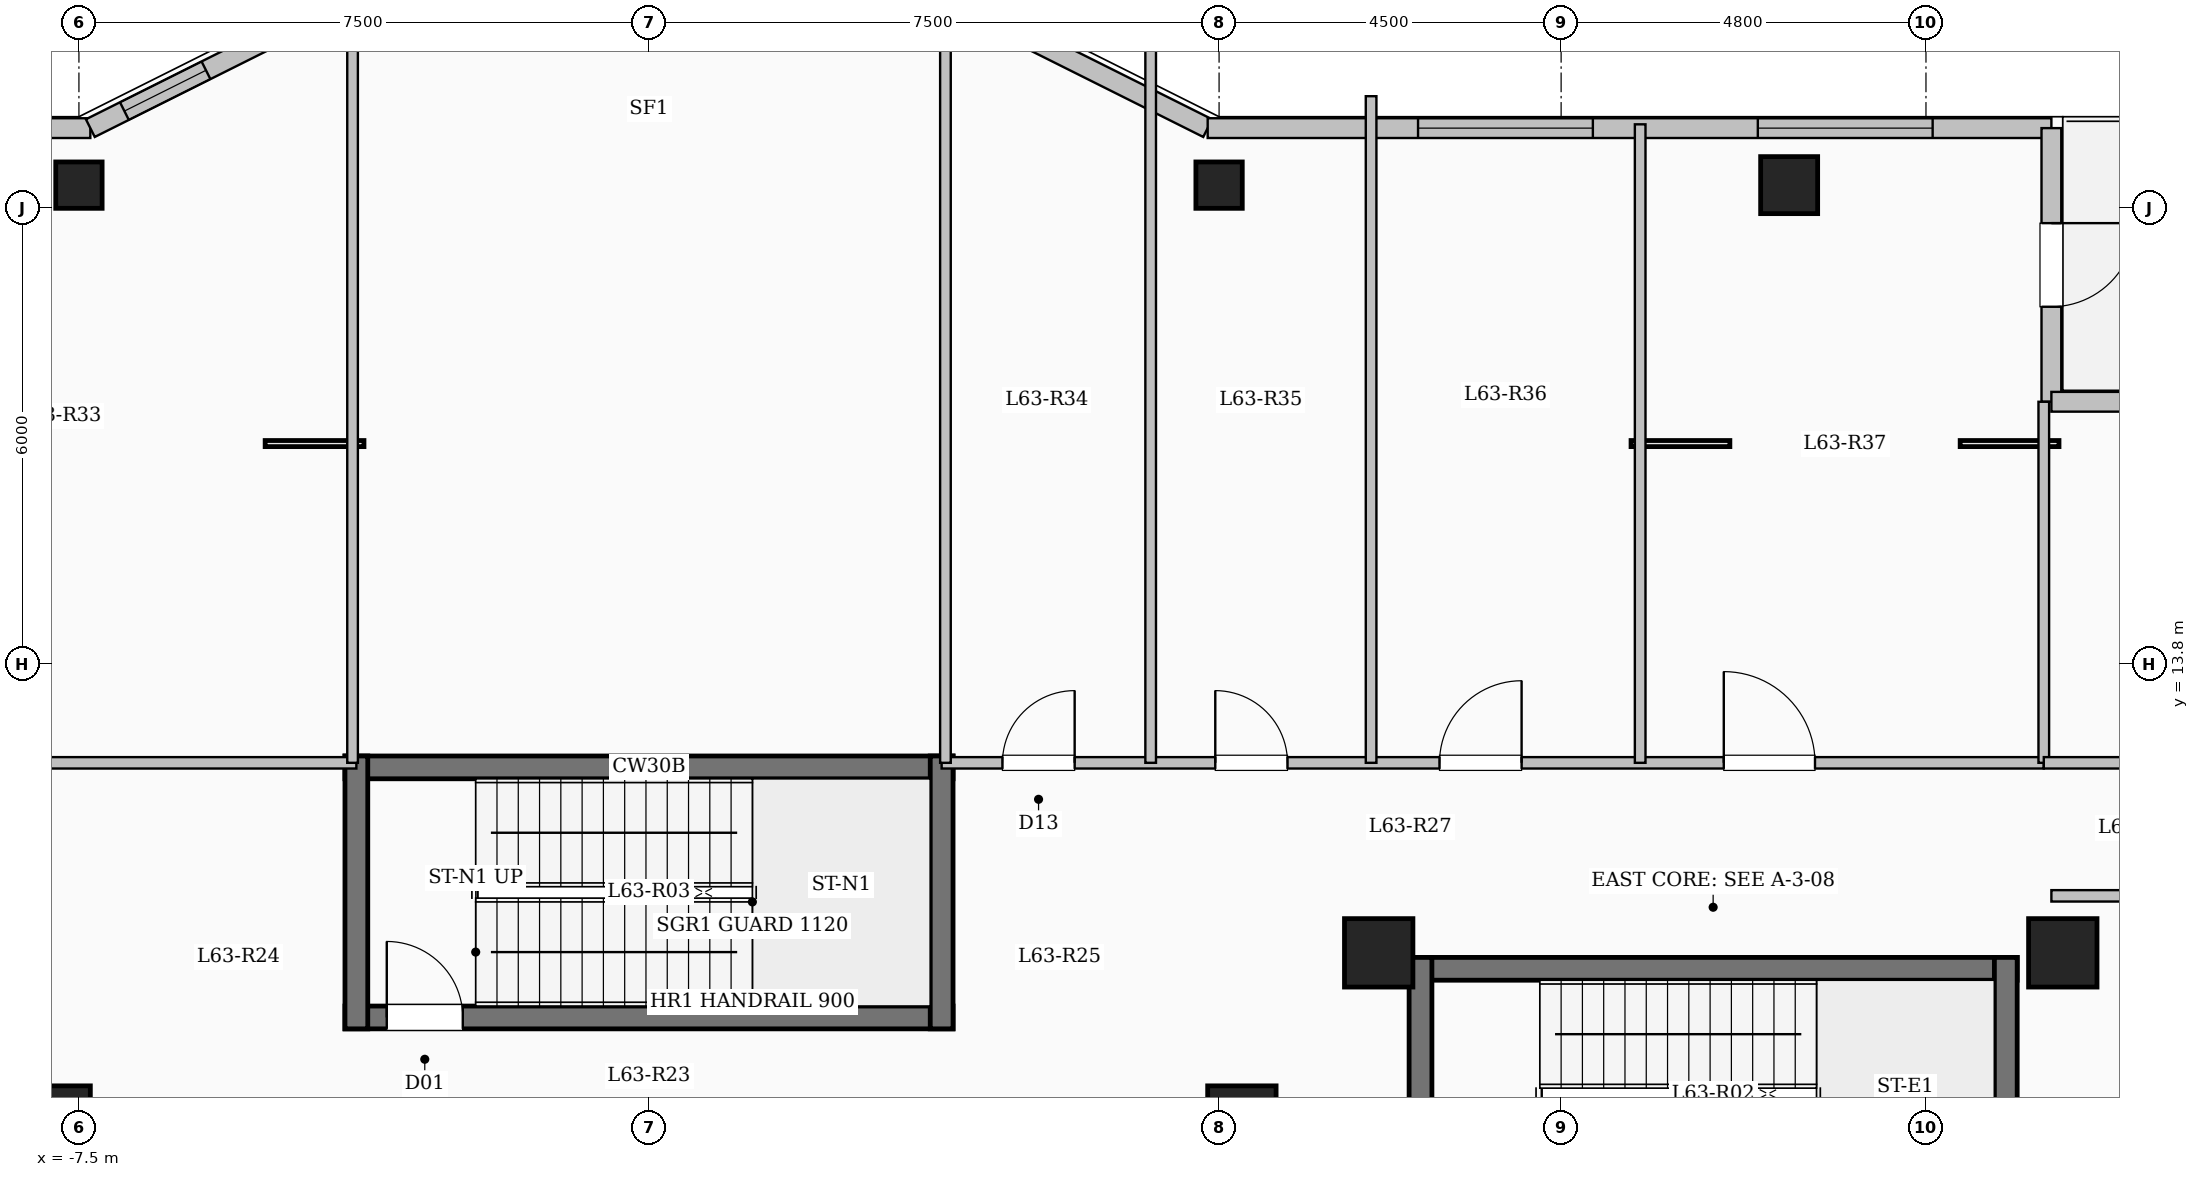
"""IFC4 building model, lengths in metres.
Left out: names, types, materials, properties, quantities, classifications, styles, units other than length and angle.
Written with IfcOpenShell. Run it as: python <this file> out.ifc"""

import sys

from ifc_helpers import new_model, si_unit, direction, frame, frame_2d, origin, origin_2d, place, context, subcontext, project, spatial, rectangle, hollow_circle, extrude, element, fill, save


model = new_model("IFC4")
c1 = context("Model", 3, precision=1e-05, world=origin(), true_north=direction((0.0, 1.0)))
c2 = subcontext(c1, "Body", "Model", "MODEL_VIEW")
j1 = project(units=[si_unit("LENGTHUNIT", "METRE"), si_unit("PLANEANGLEUNIT", "RADIAN")], contexts=[c1])
p1 = place(None, origin())
s1 = spatial("IfcSite", under=j1, at=p1, CompositionType="ELEMENT")
p2 = place(p1, origin())
s2 = spatial("IfcBuilding", under=s1, at=p2, CompositionType="ELEMENT")
p3 = place(p2, frame((0.0, 0.0, 231.75)))
s3 = spatial("IfcBuildingStorey", under=s2, at=p3, CompositionType="ELEMENT", Elevation=231.75)
for number, where, z_axis, x_axis in (
    (1, (-7.8, 7.8, 0.0), (0.0, 0.0, 1.0), (1.0, 0.0, 0.0)),
    (2, (7.8, 7.8, 0.0), (0.0, 0.0, 1.0), (1.0, 0.0, 0.0)),
    (3, (9.6, 10.0, 0.0), (0.0, 0.0, 1.0), (1.0, 0.0, 0.0)),
    (4, (18.6, 10.0, 0.0), (0.0, 0.0, 1.0), (1.0, 0.0, 0.0)),
):
    element("IfcColumn", number, at=place(p3, frame(where, z_axis=z_axis, x_axis=x_axis)), inside=s3, PredefinedType="COLUMN", context=c2, shape_type="SweptSolid", body=[
        extrude(rectangle(XDim=0.9, YDim=0.9, at=origin_2d()), origin(), (0.0, 0.0, 1.0), 4.65),
    ])
for number, where, z_axis, x_axis in (
    (5, (-7.5, 20.1, 0.0), (0.0, 0.0, 1.0), (1.0, 0.0, 0.0)),
    (6, (7.5, 20.1, 0.0), (0.0, 0.0, 1.0), (1.0, 0.0, 0.0)),
):
    element("IfcColumn", number, at=place(p3, frame(where, z_axis=z_axis, x_axis=x_axis)), inside=s3, PredefinedType="COLUMN", context=c2, shape_type="SweptSolid", body=[
        extrude(hollow_circle(Radius=0.305, WallThickness=0.025, at=origin_2d()), origin(), (0.0, 0.0, 1.0), 4.65),
    ])
p4 = place(p3, frame((15.0, 20.1, 0.0), z_axis=(0.0, 0.0, 1.0), x_axis=(1.0, 0.0, 0.0)))
e7 = element("IfcColumn", 7, at=p4, inside=s3, PredefinedType="COLUMN", context=c2, shape_type="SweptSolid", body=[
    extrude(rectangle(XDim=0.75, YDim=0.75, at=origin_2d()), origin(), (0.0, 0.0, 1.0), 4.65),
])
p5 = place(p3, frame((-18.45, 20.85, 0.0), z_axis=(0.0, 0.0, 1.0), x_axis=(1.0, 0.0, 0.0)))
e8 = element("IfcWall", 8, at=p5, inside=s3, PredefinedType="SOLIDWALL", context=c2, shape_type="SweptSolid", body=[
    extrude(rectangle(XDim=11.1, YDim=0.26, at=frame_2d((5.55, 0.0))), origin(), (0.0, 0.0, 1.0), 4.35),
])
p6 = place(p5, frame((2.14, 0.0, 0.85)))
e9 = element("IfcOpeningElement", 9, at=p6, cuts=e8, PredefinedType="OPENING", context=c2, shape_type="SweptSolid", body=[
    extrude(rectangle(XDim=2.3, YDim=2.2, at=frame_2d((1.15, 1.1))), frame((0.0, 0.14, 0.0), z_axis=(0.0, -1.0, 0.0), x_axis=(1.0, 0.0, 0.0)), (0.0, 0.0, 1.0), 0.28),
])
p7 = place(p5, frame((7.765, 0.0, 0.85)))
e10 = element("IfcOpeningElement", 10, at=p7, cuts=e8, PredefinedType="OPENING", context=c2, shape_type="SweptSolid", body=[
    extrude(rectangle(XDim=2.3, YDim=2.2, at=frame_2d((1.15, 1.1))), frame((0.0, 0.14, 0.0), z_axis=(0.0, -1.0, 0.0), x_axis=(1.0, 0.0, 0.0)), (0.0, 0.0, 1.0), 0.28),
])
p8 = place(p3, frame((-7.35, 20.85, 0.0), z_axis=(0.0, 0.0, 1.0), x_axis=(0.894427191, 0.4472135955, 0.0)))
e11 = element("IfcWall", 11, at=p8, inside=s3, PredefinedType="SOLIDWALL", context=c2, shape_type="SweptSolid", body=[
    extrude(rectangle(XDim=3.354, YDim=0.26, at=frame_2d((1.677, 0.0))), origin(), (0.0, 0.0, 1.0), 4.35),
])
p9 = place(p8, frame((0.501, 0.0, 0.95)))
e12 = element("IfcOpeningElement", 12, at=p9, cuts=e11, PredefinedType="OPENING", context=c2, shape_type="SweptSolid", body=[
    extrude(rectangle(XDim=1.2, YDim=1.5, at=frame_2d((0.6, 0.75))), frame((0.0, 0.14, 0.0), z_axis=(0.0, -1.0, 0.0), x_axis=(1.0, 0.0, 0.0)), (0.0, 0.0, 1.0), 0.28),
])
p10 = place(p3, frame((4.35, 22.35, 0.0), z_axis=(0.0, 0.0, 1.0), x_axis=(0.894427191, -0.4472135955, 0.0)))
e13 = element("IfcWall", 13, at=p10, inside=s3, PredefinedType="SOLIDWALL", context=c2, shape_type="SweptSolid", body=[
    extrude(rectangle(XDim=3.354, YDim=0.26, at=frame_2d((1.677, 0.0))), origin(), (0.0, 0.0, 1.0), 4.35),
])
p11 = place(p3, frame((7.35, 20.85, 0.0), z_axis=(0.0, 0.0, 1.0), x_axis=(1.0, 0.0, 0.0)))
e14 = element("IfcWall", 14, at=p11, inside=s3, PredefinedType="SOLIDWALL", context=c2, shape_type="SweptSolid", body=[
    extrude(rectangle(XDim=11.1, YDim=0.26, at=frame_2d((5.55, 0.0))), origin(), (0.0, 0.0, 1.0), 4.35),
])
p12 = place(p11, frame((2.768, 0.0, 0.85)))
e15 = element("IfcOpeningElement", 15, at=p12, cuts=e14, PredefinedType="OPENING", context=c2, shape_type="SweptSolid", body=[
    extrude(rectangle(XDim=2.3, YDim=2.2, at=frame_2d((1.15, 1.1))), frame((0.0, 0.14, 0.0), z_axis=(0.0, -1.0, 0.0), x_axis=(1.0, 0.0, 0.0)), (0.0, 0.0, 1.0), 0.28),
])
p13 = place(p11, frame((7.238, 0.0, 0.85)))
e16 = element("IfcOpeningElement", 16, at=p13, cuts=e14, PredefinedType="OPENING", context=c2, shape_type="SweptSolid", body=[
    extrude(rectangle(XDim=2.3, YDim=2.2, at=frame_2d((1.15, 1.1))), frame((0.0, 0.14, 0.0), z_axis=(0.0, -1.0, 0.0), x_axis=(1.0, 0.0, 0.0)), (0.0, 0.0, 1.0), 0.28),
])
p14 = place(p3, frame((18.45, 20.85, 0.0), z_axis=(0.0, 0.0, 1.0), x_axis=(0.0, -1.0, 0.0)))
e17 = element("IfcWall", 17, at=p14, inside=s3, PredefinedType="SOLIDWALL", context=c2, shape_type="SweptSolid", body=[
    extrude(rectangle(XDim=3.6, YDim=0.26, at=frame_2d((1.8, 0.0))), origin(), (0.0, 0.0, 1.0), 4.35),
])
p15 = place(p14, frame((1.25, 0.0, 0.0)))
e18 = element("IfcOpeningElement", 18, at=p15, cuts=e17, PredefinedType="OPENING", context=c2, shape_type="SweptSolid", body=[
    extrude(rectangle(XDim=1.1, YDim=2.2, at=frame_2d((0.55, 1.1))), frame((0.0, 0.14, 0.0), z_axis=(0.0, -1.0, 0.0), x_axis=(1.0, 0.0, 0.0)), (0.0, 0.0, 1.0), 0.28),
])
p16 = place(p3, frame((18.45, 17.25, 0.0), z_axis=(0.0, 0.0, 1.0), x_axis=(1.0, 0.0, 0.0)))
e19 = element("IfcWall", 19, at=p16, inside=s3, PredefinedType="SOLIDWALL", context=c2, shape_type="SweptSolid", body=[
    extrude(rectangle(XDim=5.1, YDim=0.26, at=frame_2d((2.55, 0.0))), origin(), (0.0, 0.0, 1.0), 4.35),
])
p17 = place(p16, frame((1.375, 0.0, 0.85)))
e20 = element("IfcOpeningElement", 20, at=p17, cuts=e19, PredefinedType="OPENING", context=c2, shape_type="SweptSolid", body=[
    extrude(rectangle(XDim=2.3, YDim=2.2, at=frame_2d((1.15, 1.1))), frame((0.0, 0.14, 0.0), z_axis=(0.0, -1.0, 0.0), x_axis=(1.0, 0.0, 0.0)), (0.0, 0.0, 1.0), 0.28),
])
p18 = place(p3, frame((10.0, 9.79, 0.0), z_axis=(0.0, 0.0, 1.0), x_axis=(1.0, 0.0, 0.0)))
e21 = element("IfcWall", 21, at=p18, inside=s3, PredefinedType="SHEAR", context=c2, shape_type="SweptSolid", body=[
    extrude(rectangle(XDim=8.0, YDim=0.3, at=frame_2d((4.0, 0.0))), origin(), (0.0, 0.0, 1.0), 4.65),
])
for number, where, z_axis, x_axis in (
    (22, (10.15, 6.35, 0.0), (0.0, 0.0, 1.0), (0.0, 1.0, 0.0)),
    (23, (17.85, 6.35, 0.0), (0.0, 0.0, 1.0), (0.0, 1.0, 0.0)),
):
    element("IfcWall", number, at=place(p3, frame(where, z_axis=z_axis, x_axis=x_axis)), inside=s3, PredefinedType="SHEAR", context=c2, shape_type="SweptSolid", body=[
        extrude(rectangle(XDim=3.59, YDim=0.3, at=frame_2d((1.795, 0.0))), origin(), (0.0, 0.0, 1.0), 4.65),
    ])
p19 = place(p3, frame((-4.0, 12.44, 0.0), z_axis=(0.0, 0.0, 1.0), x_axis=(1.0, 0.0, 0.0)))
e24 = element("IfcWall", 24, at=p19, inside=s3, PredefinedType="SHEAR", context=c2, shape_type="SweptSolid", body=[
    extrude(rectangle(XDim=8.0, YDim=0.3, at=frame_2d((4.0, 0.0))), origin(), (0.0, 0.0, 1.0), 4.65),
])
p20 = place(p3, frame((-4.0, 9.15, 0.0), z_axis=(0.0, 0.0, 1.0), x_axis=(1.0, 0.0, 0.0)))
e25 = element("IfcWall", 25, at=p20, inside=s3, PredefinedType="SHEAR", context=c2, shape_type="SweptSolid", body=[
    extrude(rectangle(XDim=8.0, YDim=0.3, at=frame_2d((4.0, 0.0))), origin(), (0.0, 0.0, 1.0), 4.65),
])
p21 = place(p20, frame((0.55, 0.0, 0.0)))
e26 = element("IfcOpeningElement", 26, at=p21, cuts=e25, PredefinedType="OPENING", context=c2, shape_type="SweptSolid", body=[
    extrude(rectangle(XDim=1.0, YDim=2.15, at=frame_2d((0.5, 1.075))), frame((0.0, 0.16, 0.0), z_axis=(0.0, -1.0, 0.0), x_axis=(1.0, 0.0, 0.0)), (0.0, 0.0, 1.0), 0.32),
])
for number, where, z_axis, x_axis in (
    (27, (-3.85, 9.0, 0.0), (0.0, 0.0, 1.0), (0.0, 1.0, 0.0)),
    (28, (3.85, 9.0, 0.0), (0.0, 0.0, 1.0), (0.0, 1.0, 0.0)),
):
    element("IfcWall", number, at=place(p3, frame(where, z_axis=z_axis, x_axis=x_axis)), inside=s3, PredefinedType="SHEAR", context=c2, shape_type="SweptSolid", body=[
        extrude(rectangle(XDim=3.59, YDim=0.3, at=frame_2d((1.795, 0.0))), origin(), (0.0, 0.0, 1.0), 4.65),
    ])
p22 = place(p3, frame((-18.35, 12.5, 0.0), z_axis=(0.0, 0.0, 1.0), x_axis=(1.0, 0.0, 0.0)))
e29 = element("IfcWall", 29, at=p22, inside=s3, PredefinedType="PARTITIONING", context=c2, shape_type="SweptSolid", body=[
    extrude(rectangle(XDim=14.5, YDim=0.15, at=frame_2d((7.25, 0.0))), origin(), (0.0, 0.0, 1.0), 4.35),
])
p23 = place(p22, frame((1.2, 0.0, 0.0)))
e30 = element("IfcOpeningElement", 30, at=p23, cuts=e29, PredefinedType="OPENING", context=c2, shape_type="SweptSolid", body=[
    extrude(rectangle(XDim=1.2, YDim=2.15, at=frame_2d((0.6, 1.075))), frame((0.0, 0.085, 0.0), z_axis=(0.0, -1.0, 0.0), x_axis=(1.0, 0.0, 0.0)), (0.0, 0.0, 1.0), 0.17),
])
p24 = place(p22, frame((7.58, 0.0, 0.0)))
e31 = element("IfcOpeningElement", 31, at=p24, cuts=e29, PredefinedType="OPENING", context=c2, shape_type="SweptSolid", body=[
    extrude(rectangle(XDim=1.08, YDim=2.15, at=frame_2d((0.54, 1.075))), frame((0.0, 0.085, 0.0), z_axis=(0.0, -1.0, 0.0), x_axis=(1.0, 0.0, 0.0)), (0.0, 0.0, 1.0), 0.17),
])
p25 = place(p3, frame((3.85, 12.5, 0.0), z_axis=(0.0, 0.0, 1.0), x_axis=(1.0, 0.0, 0.0)))
e32 = element("IfcWall", 32, at=p25, inside=s3, PredefinedType="PARTITIONING", context=c2, shape_type="SweptSolid", body=[
    extrude(rectangle(XDim=14.5, YDim=0.15, at=frame_2d((7.25, 0.0))), origin(), (0.0, 0.0, 1.0), 4.35),
])
p26 = place(p25, frame((0.8, 0.0, 0.0)))
e33 = element("IfcOpeningElement", 33, at=p26, cuts=e32, PredefinedType="OPENING", context=c2, shape_type="SweptSolid", body=[
    extrude(rectangle(XDim=0.95, YDim=2.15, at=frame_2d((0.475, 1.075))), frame((0.0, 0.085, 0.0), z_axis=(0.0, -1.0, 0.0), x_axis=(1.0, 0.0, 0.0)), (0.0, 0.0, 1.0), 0.17),
])
p27 = place(p25, frame((3.6, 0.0, 0.0)))
e34 = element("IfcOpeningElement", 34, at=p27, cuts=e32, PredefinedType="OPENING", context=c2, shape_type="SweptSolid", body=[
    extrude(rectangle(XDim=0.95, YDim=2.15, at=frame_2d((0.475, 1.075))), frame((0.0, 0.085, 0.0), z_axis=(0.0, -1.0, 0.0), x_axis=(1.0, 0.0, 0.0)), (0.0, 0.0, 1.0), 0.17),
])
p28 = place(p25, frame((6.55, 0.0, 0.0)))
e35 = element("IfcOpeningElement", 35, at=p28, cuts=e32, PredefinedType="OPENING", context=c2, shape_type="SweptSolid", body=[
    extrude(rectangle(XDim=1.08, YDim=2.15, at=frame_2d((0.54, 1.075))), frame((0.0, 0.085, 0.0), z_axis=(0.0, -1.0, 0.0), x_axis=(1.0, 0.0, 0.0)), (0.0, 0.0, 1.0), 0.17),
])
p29 = place(p25, frame((10.29, 0.0, 0.0)))
e36 = element("IfcOpeningElement", 36, at=p29, cuts=e32, PredefinedType="OPENING", context=c2, shape_type="SweptSolid", body=[
    extrude(rectangle(XDim=1.2, YDim=2.15, at=frame_2d((0.6, 1.075))), frame((0.0, 0.085, 0.0), z_axis=(0.0, -1.0, 0.0), x_axis=(1.0, 0.0, 0.0)), (0.0, 0.0, 1.0), 0.17),
])
for number, where, z_axis, x_axis in (
    (37, (-3.9, 12.5, 0.0), (0.0, 0.0, 1.0), (0.0, 1.0, 0.0)),
    (38, (3.9, 12.5, 0.0), (0.0, 0.0, 1.0), (0.0, 1.0, 0.0)),
):
    element("IfcWall", number, at=place(p3, frame(where, z_axis=z_axis, x_axis=x_axis)), inside=s3, PredefinedType="PARTITIONING", context=c2, shape_type="SweptSolid", body=[
        extrude(rectangle(XDim=9.88, YDim=0.14, at=frame_2d((4.94, 0.0))), origin(), (0.0, 0.0, 1.0), 4.35),
    ])
p30 = place(p3, frame((6.6, 12.5, 0.0), z_axis=(0.0, 0.0, 1.0), x_axis=(0.0, 1.0, 0.0)))
e39 = element("IfcWall", 39, at=p30, inside=s3, PredefinedType="PARTITIONING", context=c2, shape_type="SweptSolid", body=[
    extrude(rectangle(XDim=9.485, YDim=0.14, at=frame_2d((4.743, 0.0))), origin(), (0.0, 0.0, 1.0), 4.35),
])
p31 = place(p3, frame((9.5, 12.5, 0.0), z_axis=(0.0, 0.0, 1.0), x_axis=(0.0, 1.0, 0.0)))
e40 = element("IfcWall", 40, at=p31, inside=s3, PredefinedType="PARTITIONING", context=c2, shape_type="SweptSolid", body=[
    extrude(rectangle(XDim=8.77, YDim=0.14, at=frame_2d((4.385, 0.0))), origin(), (0.0, 0.0, 1.0), 4.35),
])
p32 = place(p3, frame((13.04, 12.5, 0.0), z_axis=(0.0, 0.0, 1.0), x_axis=(0.0, 1.0, 0.0)))
e41 = element("IfcWall", 41, at=p32, inside=s3, PredefinedType="PARTITIONING", context=c2, shape_type="SweptSolid", body=[
    extrude(rectangle(XDim=8.4, YDim=0.14, at=frame_2d((4.2, 0.0))), origin(), (0.0, 0.0, 1.0), 4.35),
])
p33 = place(p3, frame((18.45, 10.75, 0.0), z_axis=(0.0, 0.0, 1.0), x_axis=(1.0, 0.0, 0.0)))
e42 = element("IfcWall", 42, at=p33, inside=s3, PredefinedType="PARTITIONING", context=c2, shape_type="SweptSolid", body=[
    extrude(rectangle(XDim=5.13, YDim=0.15, at=frame_2d((2.565, 0.0))), origin(), (0.0, 0.0, 1.0), 4.35),
])
p34 = place(p3, frame((18.35, 12.5, 0.0), z_axis=(0.0, 0.0, 1.0), x_axis=(0.0, 1.0, 0.0)))
e43 = element("IfcWall", 43, at=p34, inside=s3, PredefinedType="PARTITIONING", context=c2, shape_type="SweptSolid", body=[
    extrude(rectangle(XDim=4.75, YDim=0.14, at=frame_2d((2.375, 0.0))), origin(), (0.0, 0.0, 1.0), 4.35),
])
p35 = place(p3, frame((18.35, 12.5, 0.0), z_axis=(0.0, 0.0, 1.0), x_axis=(1.0, 0.0, 0.0)))
e44 = element("IfcWall", 44, at=p35, inside=s3, PredefinedType="PARTITIONING", context=c2, shape_type="SweptSolid", body=[
    extrude(rectangle(XDim=5.23, YDim=0.15, at=frame_2d((2.615, 0.0))), origin(), (0.0, 0.0, 1.0), 4.35),
])
p36 = place(p35, frame((2.14, 0.0, 0.0)))
e45 = element("IfcOpeningElement", 45, at=p36, cuts=e44, PredefinedType="OPENING", context=c2, shape_type="SweptSolid", body=[
    extrude(rectangle(XDim=0.95, YDim=2.15, at=frame_2d((0.475, 1.075))), frame((0.0, 0.085, 0.0), z_axis=(0.0, -1.0, 0.0), x_axis=(1.0, 0.0, 0.0)), (0.0, 0.0, 1.0), 0.17),
])
p37 = place(p9, origin())
e46 = element("IfcWindow", 46, at=p37, inside=s3, PartitioningType="SINGLE_PANEL", PredefinedType="WINDOW", context=c2, shape_type="SweptSolid", body=[
    extrude(rectangle(XDim=1.2, YDim=1.5, at=frame_2d((0.6, 0.75))), frame((0.0, 0.03, 0.0), z_axis=(0.0, -1.0, 0.0), x_axis=(1.0, 0.0, 0.0)), (0.0, 0.0, 1.0), 0.06),
])
fill(e12, e46)
p38 = place(p12, origin())
e47 = element("IfcWindow", 47, at=p38, inside=s3, PartitioningType="SINGLE_PANEL", PredefinedType="WINDOW", context=c2, shape_type="SweptSolid", body=[
    extrude(rectangle(XDim=2.3, YDim=2.2, at=frame_2d((1.15, 1.1))), frame((0.0, 0.03, 0.0), z_axis=(0.0, -1.0, 0.0), x_axis=(1.0, 0.0, 0.0)), (0.0, 0.0, 1.0), 0.06),
])
fill(e15, e47)
p39 = place(p13, origin())
e48 = element("IfcWindow", 48, at=p39, inside=s3, PartitioningType="SINGLE_PANEL", PredefinedType="WINDOW", context=c2, shape_type="SweptSolid", body=[
    extrude(rectangle(XDim=2.3, YDim=2.2, at=frame_2d((1.15, 1.1))), frame((0.0, 0.03, 0.0), z_axis=(0.0, -1.0, 0.0), x_axis=(1.0, 0.0, 0.0)), (0.0, 0.0, 1.0), 0.06),
])
fill(e16, e48)
p40 = place(p15, origin())
e49 = element("IfcDoor", 49, at=p40, inside=s3, OperationType="SINGLE_SWING_LEFT", PredefinedType="DOOR", context=c2, shape_type="SweptSolid", body=[
    extrude(rectangle(XDim=1.1, YDim=2.2, at=frame_2d((0.55, 1.1))), frame((0.0, 0.025, 0.0), z_axis=(0.0, -1.0, 0.0), x_axis=(1.0, 0.0, 0.0)), (0.0, 0.0, 1.0), 0.05),
])
fill(e18, e49)
p41 = place(p21, origin())
e50 = element("IfcDoor", 50, at=p41, inside=s3, OperationType="SINGLE_SWING_LEFT", PredefinedType="DOOR", context=c2, shape_type="SweptSolid", body=[
    extrude(rectangle(XDim=1.0, YDim=2.15, at=frame_2d((0.5, 1.075))), frame((0.0, 0.025, 0.0), z_axis=(0.0, -1.0, 0.0), x_axis=(1.0, 0.0, 0.0)), (0.0, 0.0, 1.0), 0.05),
])
fill(e26, e50)
p42 = place(p26, origin())
e51 = element("IfcDoor", 51, at=p42, inside=s3, OperationType="SINGLE_SWING_RIGHT", PredefinedType="DOOR", context=c2, shape_type="SweptSolid", body=[
    extrude(rectangle(XDim=0.95, YDim=2.15, at=frame_2d((0.475, 1.075))), frame((0.0, 0.025, 0.0), z_axis=(0.0, -1.0, 0.0), x_axis=(1.0, 0.0, 0.0)), (0.0, 0.0, 1.0), 0.05),
])
fill(e33, e51)
p43 = place(p27, origin())
e52 = element("IfcDoor", 52, at=p43, inside=s3, OperationType="SINGLE_SWING_LEFT", PredefinedType="DOOR", context=c2, shape_type="SweptSolid", body=[
    extrude(rectangle(XDim=0.95, YDim=2.15, at=frame_2d((0.475, 1.075))), frame((0.0, 0.025, 0.0), z_axis=(0.0, -1.0, 0.0), x_axis=(1.0, 0.0, 0.0)), (0.0, 0.0, 1.0), 0.05),
])
fill(e34, e52)
p44 = place(p28, origin())
e53 = element("IfcDoor", 53, at=p44, inside=s3, OperationType="SINGLE_SWING_RIGHT", PredefinedType="DOOR", context=c2, shape_type="SweptSolid", body=[
    extrude(rectangle(XDim=1.08, YDim=2.15, at=frame_2d((0.54, 1.075))), frame((0.0, 0.025, 0.0), z_axis=(0.0, -1.0, 0.0), x_axis=(1.0, 0.0, 0.0)), (0.0, 0.0, 1.0), 0.05),
])
fill(e35, e53)
p45 = place(p29, origin())
e54 = element("IfcDoor", 54, at=p45, inside=s3, OperationType="SINGLE_SWING_LEFT", PredefinedType="DOOR", context=c2, shape_type="SweptSolid", body=[
    extrude(rectangle(XDim=1.2, YDim=2.15, at=frame_2d((0.6, 1.075))), frame((0.0, 0.025, 0.0), z_axis=(0.0, -1.0, 0.0), x_axis=(1.0, 0.0, 0.0)), (0.0, 0.0, 1.0), 0.05),
])
fill(e36, e54)
save(model, sys.argv[1])
